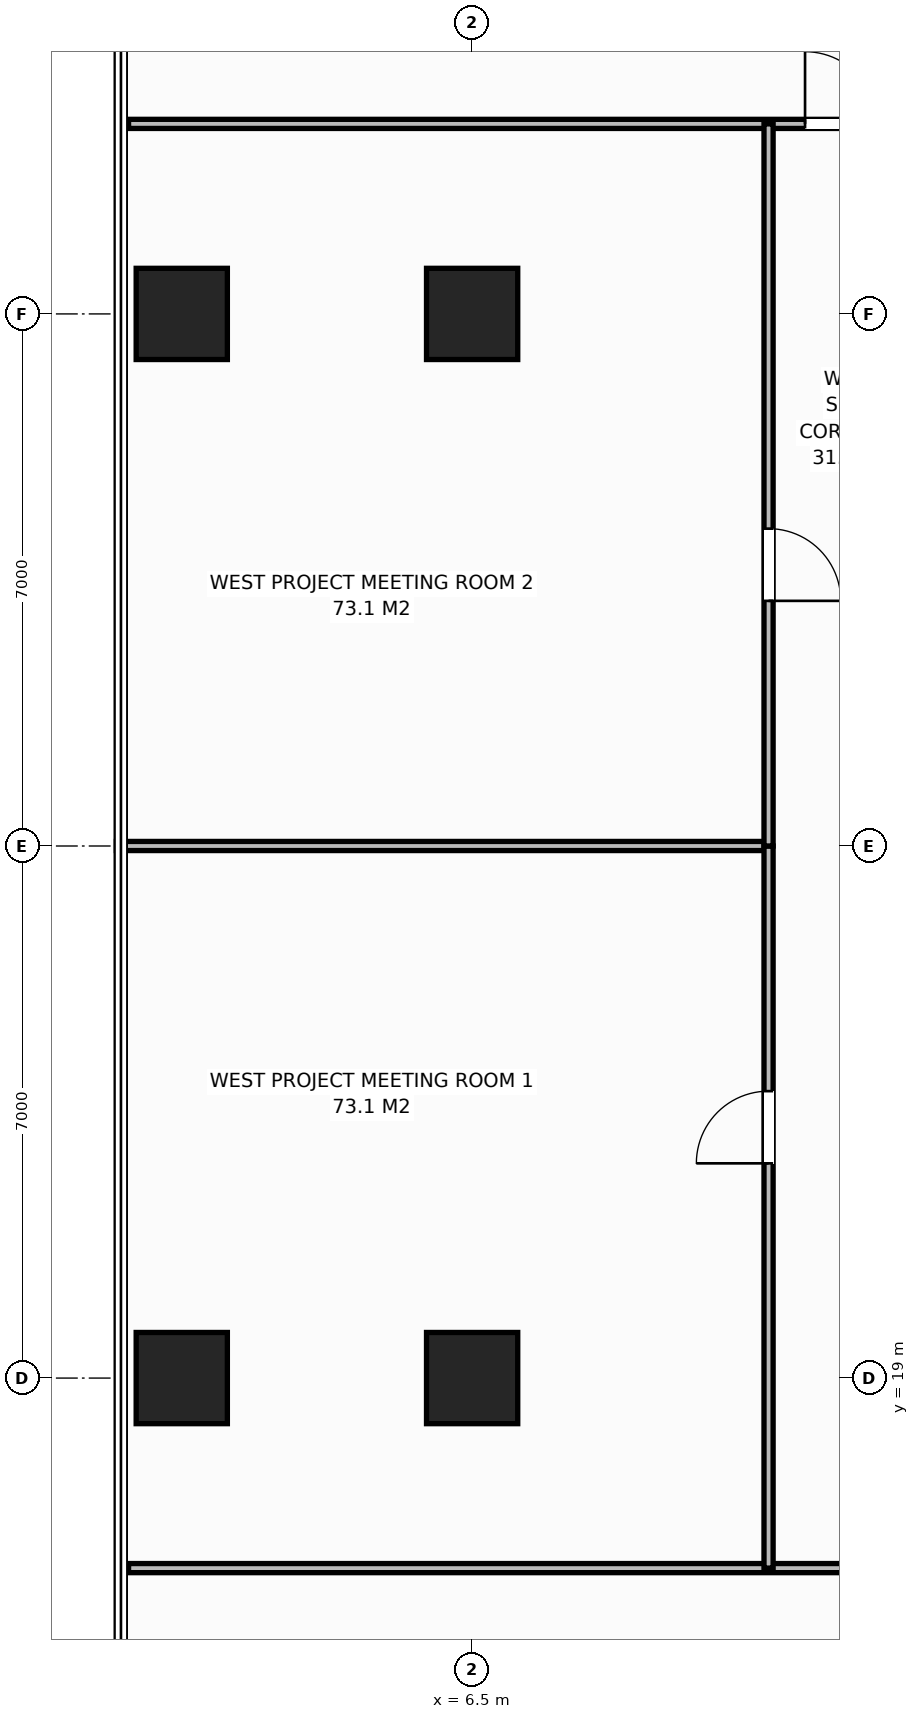
"""IFC4 building model, lengths in metres.
Left out: names, types, materials, properties, quantities, classifications, styles, units other than length and angle.
Written with IfcOpenShell. Run it as: python <this file> out.ifc"""

import sys

from ifc_helpers import new_model, si_unit, direction, frame, frame_2d, origin, origin_2d, place, context, subcontext, project, spatial, rectangle, extrude, element, fill, save


model = new_model("IFC4")
c1 = context("Model", 3, precision=1e-05, world=origin(), true_north=direction((0.0, 1.0)))
c2 = subcontext(c1, "Body", "Model", "MODEL_VIEW")
j1 = project(units=[si_unit("LENGTHUNIT", "METRE"), si_unit("PLANEANGLEUNIT", "RADIAN")], contexts=[c1])
p1 = place(None, origin())
s1 = spatial("IfcSite", under=j1, at=p1, CompositionType="ELEMENT")
p2 = place(p1, origin())
s2 = spatial("IfcBuilding", under=s1, at=p2, CompositionType="ELEMENT")
p3 = place(p2, frame((0.0, 0.0, 108.8)))
s3 = spatial("IfcBuildingStorey", under=s2, at=p3, CompositionType="ELEMENT", Elevation=108.8)
for number, where, z_axis, x_axis in (
    (1, (6.5, 19.0, 0.0), (0.0, 0.0, 1.0), (1.0, 0.0, 0.0)),
    (2, (6.5, 33.0, 0.0), (0.0, 0.0, 1.0), (1.0, 0.0, 0.0)),
    (3, (2.68, 19.0, 0.0), (0.0, 0.0, 1.0), (1.0, 0.0, 0.0)),
    (4, (2.68, 33.0, 0.0), (0.0, 0.0, 1.0), (1.0, 0.0, 0.0)),
):
    element("IfcColumn", number, at=place(p3, frame(where, z_axis=z_axis, x_axis=x_axis)), inside=s3, PredefinedType="COLUMN", context=c2, shape_type="SweptSolid", body=[
        extrude(rectangle(XDim=1.2, YDim=1.2, at=origin_2d()), origin(), (0.0, 0.0, 1.0), 3.8),
    ])
p4 = place(p3, frame((1.98, 35.5, 0.0), z_axis=(0.0, 0.0, 1.0), x_axis=(1.0, 0.0, 0.0)))
e5 = element("IfcWall", 5, at=p4, inside=s3, PredefinedType="PARTITIONING", context=c2, shape_type="SweptSolid", body=[
    extrude(rectangle(XDim=11.16, YDim=0.12, at=frame_2d((5.58, 0.0))), origin(), (0.0, 0.0, 1.0), 3.565),
])
p5 = place(p4, frame((8.9, 0.0, 0.0)))
e6 = element("IfcOpeningElement", 6, at=p5, cuts=e5, PredefinedType="OPENING", context=c2, shape_type="SweptSolid", body=[
    extrude(rectangle(XDim=0.95, YDim=2.15, at=frame_2d((0.475, 1.075))), frame((0.0, 0.07, 0.0), z_axis=(0.0, -1.0, 0.0), x_axis=(1.0, 0.0, 0.0)), (0.0, 0.0, 1.0), 0.14),
])
p6 = place(p3, frame((1.98, 16.5, 0.0), z_axis=(0.0, 0.0, 1.0), x_axis=(1.0, 0.0, 0.0)))
e7 = element("IfcWall", 7, at=p6, inside=s3, PredefinedType="PARTITIONING", context=c2, shape_type="SweptSolid", body=[
    extrude(rectangle(XDim=18.391, YDim=0.12, at=frame_2d((9.195, 0.0))), origin(), (0.0, 0.0, 1.0), 3.565),
])
p7 = place(p6, frame((12.93, 0.0, 0.0)))
e8 = element("IfcOpeningElement", 8, at=p7, cuts=e7, PredefinedType="OPENING", context=c2, shape_type="SweptSolid", body=[
    extrude(rectangle(XDim=0.95, YDim=2.15, at=frame_2d((0.475, 1.075))), frame((0.0, 0.07, 0.0), z_axis=(0.0, -1.0, 0.0), x_axis=(1.0, 0.0, 0.0)), (0.0, 0.0, 1.0), 0.14),
])
p8 = place(p3, frame((1.82, 26.0, 0.0), z_axis=(0.0, 0.0, 1.0), x_axis=(1.0, 0.0, 0.0)))
e9 = element("IfcWall", 9, at=p8, inside=s3, PredefinedType="PARTITIONING", context=c2, shape_type="SweptSolid", body=[
    extrude(rectangle(XDim=8.58, YDim=0.12, at=frame_2d((4.29, 0.0))), origin(), (0.0, 0.0, 1.0), 3.565),
])
p9 = place(p3, frame((10.4, 16.5, 0.0), z_axis=(0.0, 0.0, 1.0), x_axis=(0.0, 1.0, 0.0)))
e10 = element("IfcWall", 10, at=p9, inside=s3, PredefinedType="PARTITIONING", context=c2, shape_type="SweptSolid", body=[
    extrude(rectangle(XDim=9.5, YDim=0.12, at=frame_2d((4.75, 0.0))), origin(), (0.0, 0.0, 1.0), 3.565),
])
p10 = place(p9, frame((5.325, 0.0, 0.0)))
e11 = element("IfcOpeningElement", 11, at=p10, cuts=e10, PredefinedType="OPENING", context=c2, shape_type="SweptSolid", body=[
    extrude(rectangle(XDim=0.95, YDim=2.15, at=frame_2d((0.475, 1.075))), frame((0.0, 0.07, 0.0), z_axis=(0.0, -1.0, 0.0), x_axis=(1.0, 0.0, 0.0)), (0.0, 0.0, 1.0), 0.14),
])
p11 = place(p3, frame((10.4, 26.0, 0.0), z_axis=(0.0, 0.0, 1.0), x_axis=(0.0, 1.0, 0.0)))
e12 = element("IfcWall", 12, at=p11, inside=s3, PredefinedType="PARTITIONING", context=c2, shape_type="SweptSolid", body=[
    extrude(rectangle(XDim=9.5, YDim=0.12, at=frame_2d((4.75, 0.0))), origin(), (0.0, 0.0, 1.0), 3.565),
])
p12 = place(p11, frame((3.225, 0.0, 0.0)))
e13 = element("IfcOpeningElement", 13, at=p12, cuts=e12, PredefinedType="OPENING", context=c2, shape_type="SweptSolid", body=[
    extrude(rectangle(XDim=0.95, YDim=2.15, at=frame_2d((0.475, 1.075))), frame((0.0, 0.07, 0.0), z_axis=(0.0, -1.0, 0.0), x_axis=(1.0, 0.0, 0.0)), (0.0, 0.0, 1.0), 0.14),
])
p13 = place(p5, origin())
e14 = element("IfcDoor", 14, at=p13, inside=s3, OperationType="SINGLE_SWING_LEFT", PredefinedType="DOOR", context=c2, shape_type="SweptSolid", body=[
    extrude(rectangle(XDim=0.95, YDim=2.15, at=frame_2d((0.475, 1.075))), frame((0.0, 0.025, 0.0), z_axis=(0.0, -1.0, 0.0), x_axis=(1.0, 0.0, 0.0)), (0.0, 0.0, 1.0), 0.05),
])
fill(e6, e14)
p14 = place(p10, origin())
e15 = element("IfcDoor", 15, at=p14, inside=s3, OperationType="SINGLE_SWING_LEFT", PredefinedType="DOOR", context=c2, shape_type="SweptSolid", body=[
    extrude(rectangle(XDim=0.95, YDim=2.15, at=frame_2d((0.475, 1.075))), frame((0.0, 0.025, 0.0), z_axis=(0.0, -1.0, 0.0), x_axis=(1.0, 0.0, 0.0)), (0.0, 0.0, 1.0), 0.05),
])
fill(e11, e15)
p15 = place(p12, origin())
e16 = element("IfcDoor", 16, at=p15, inside=s3, OperationType="SINGLE_SWING_RIGHT", PredefinedType="DOOR", context=c2, shape_type="SweptSolid", body=[
    extrude(rectangle(XDim=0.95, YDim=2.15, at=frame_2d((0.475, 1.075))), frame((0.0, 0.025, 0.0), z_axis=(0.0, -1.0, 0.0), x_axis=(1.0, 0.0, 0.0)), (0.0, 0.0, 1.0), 0.05),
])
fill(e13, e16)
save(model, sys.argv[1])
